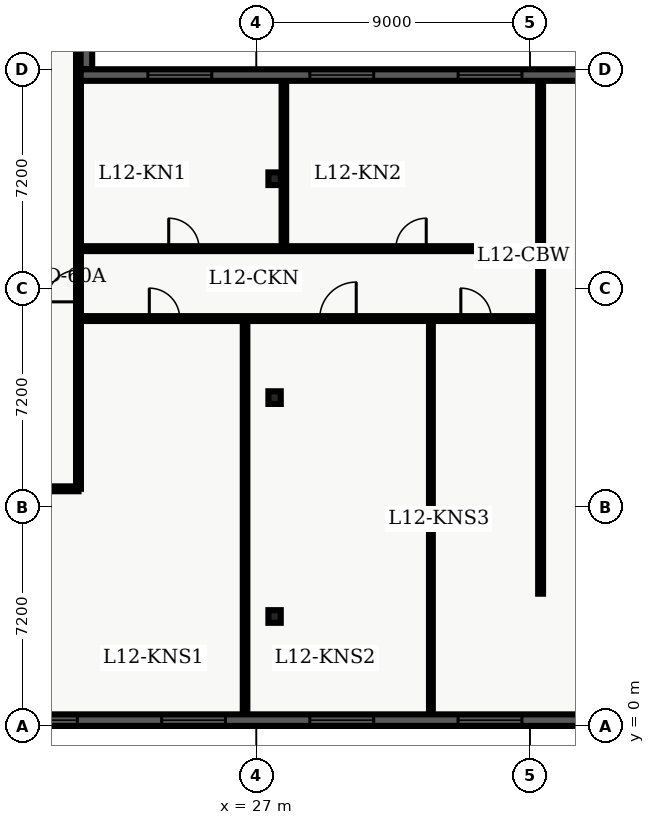
"""IFC4 building model, lengths in metres.
Left out: names, types, materials, properties, quantities, classifications, styles, units other than length and angle.
Written with IfcOpenShell. Run it as: python <this file> out.ifc"""

import sys

from ifc_helpers import new_model, entity, si_unit, converted_unit, direction, frame, origin_with_axes, origin_2d_with_axis, place, context, subcontext, project, spatial, polyline, rectangle, i_section, outline, extrude, element, fill, save


model = new_model("IFC4")
c1 = context("Model", 3, precision=1e-05, world=origin_with_axes(), true_north=direction((0.0, 1.0)))
c2 = subcontext(c1, "Body", "Model", "MODEL_VIEW")
j1 = project(units=[si_unit("LENGTHUNIT", "METRE"), converted_unit("PLANEANGLEUNIT", "DEGREE", entity("IfcPlaneAngleMeasure", 0.017), si_unit("PLANEANGLEUNIT", "RADIAN"), dimensions=[0, 0, 0, 0, 0, 0, 0])], contexts=[c1])
p1 = place(None, origin_with_axes())
s1 = spatial("IfcSite", under=j1, at=p1, CompositionType="ELEMENT")
p2 = place(p1, origin_with_axes())
s2 = spatial("IfcBuilding", under=s1, at=p2, CompositionType="ELEMENT")
p3 = place(p2, frame((0.0, 0.0, 52.2), z_axis=(0.0, 0.0, 1.0), x_axis=(1.0, 0.0, 0.0)))
s3 = spatial("IfcBuildingStorey", under=s2, at=p3, CompositionType="ELEMENT", Elevation=52.2)
for number, where, z_axis, x_axis in (
    (1, (27.6, 3.6, 0.0), (0.0, 0.0, 1.0), (1.0, 0.0, 0.0)),
    (2, (27.6, 10.8, 0.0), (0.0, 0.0, 1.0), (1.0, 0.0, 0.0)),
    (3, (27.6, 18.0, 0.0), (0.0, 0.0, 1.0), (1.0, 0.0, 0.0)),
):
    element("IfcColumn", number, at=place(p3, frame(where, z_axis=z_axis, x_axis=x_axis)), inside=s3, PredefinedType="COLUMN", context=c2, shape_type="SweptSolid", body=[
        extrude(i_section(OverallWidth=0.406, OverallDepth=0.416, WebThickness=0.03, FlangeThickness=0.048, FilletRadius=0.022, at=origin_2d_with_axis()), origin_with_axes(), (0.0, 0.0, 1.0), 3.9),
    ])
p4 = place(p3, frame((2.6, 7.8, 0.0), z_axis=(0.0, 0.0, 1.0), x_axis=(1.0, 0.0, 0.0)))
e4 = element("IfcWall", 4, at=p4, inside=s3, PredefinedType="PARTITIONING", context=c2, shape_type="SweptSolid", body=[
    extrude(outline(polyline([(0.0, -0.08), (18.55, -0.08), (18.55, 0.08), (0.0, 0.08), (0.0, -0.08)])), origin_with_axes(), (0.0, 0.0, 1.0), 2.7),
])
p5 = place(p4, frame((6.426, 0.0, 0.0), z_axis=(0.0, 0.0, 1.0), x_axis=(1.0, 0.0, 0.0)))
e5 = element("IfcOpeningElement", 5, at=p5, cuts=e4, PredefinedType="OPENING", context=c2, shape_type="SweptSolid", body=[
    extrude(rectangle(XDim=1.2, YDim=0.18, at=origin_2d_with_axis()), origin_with_axes(), (0.0, 0.0, 1.0), 2.2),
])
p6 = place(p4, frame((15.681, 0.0, 0.0), z_axis=(0.0, 0.0, 1.0), x_axis=(1.0, 0.0, 0.0)))
e6 = element("IfcOpeningElement", 6, at=p6, cuts=e4, PredefinedType="OPENING", context=c2, shape_type="SweptSolid", body=[
    extrude(rectangle(XDim=1.0, YDim=0.18, at=origin_2d_with_axis()), origin_with_axes(), (0.0, 0.0, 1.0), 2.15),
])
p7 = place(p3, frame((21.15, 7.8, 0.0), z_axis=(0.0, 0.0, 1.0), x_axis=(0.0, 1.0, 0.0)))
e7 = element("IfcWall", 7, at=p7, inside=s3, PredefinedType="PARTITIONING", context=c2, shape_type="SweptSolid", body=[
    extrude(outline(polyline([(0.0, -0.08), (32.7, -0.08), (32.7, 0.08), (0.0, 0.08), (0.0, -0.08)])), origin_with_axes(), (0.0, 0.0, 1.0), 2.7),
])
p8 = place(p7, frame((6.675, 0.0, 0.0), z_axis=(0.0, 0.0, 1.0), x_axis=(1.0, 0.0, 0.0)))
e8 = element("IfcOpeningElement", 8, at=p8, cuts=e7, PredefinedType="OPENING", context=c2, shape_type="SweptSolid", body=[
    extrude(rectangle(XDim=1.05, YDim=0.18, at=origin_2d_with_axis()), origin_with_axes(), (0.0, 0.0, 1.0), 2.15),
])
p9 = place(p3, frame((21.15, 13.4, 0.0), z_axis=(0.0, 0.0, 1.0), x_axis=(1.0, 0.0, 0.0)))
e9 = element("IfcWall", 9, at=p9, inside=s3, PredefinedType="PARTITIONING", context=c2, shape_type="SweptSolid", body=[
    extrude(outline(polyline([(0.0, -0.08), (15.2, -0.08), (15.2, 0.08), (0.0, 0.08), (0.0, -0.08)])), origin_with_axes(), (0.0, 0.0, 1.0), 2.7),
])
p10 = place(p9, frame((2.829, 0.0, 0.0), z_axis=(0.0, 0.0, 1.0), x_axis=(1.0, 0.0, 0.0)))
e10 = element("IfcOpeningElement", 10, at=p10, cuts=e9, PredefinedType="OPENING", context=c2, shape_type="SweptSolid", body=[
    extrude(rectangle(XDim=1.0, YDim=0.18, at=origin_2d_with_axis()), origin_with_axes(), (0.0, 0.0, 1.0), 2.15),
])
p11 = place(p9, frame((8.536, 0.0, 0.0), z_axis=(0.0, 0.0, 1.0), x_axis=(1.0, 0.0, 0.0)))
e11 = element("IfcOpeningElement", 11, at=p11, cuts=e9, PredefinedType="OPENING", context=c2, shape_type="SweptSolid", body=[
    extrude(rectangle(XDim=1.2, YDim=0.18, at=origin_2d_with_axis()), origin_with_axes(), (0.0, 0.0, 1.0), 2.2),
])
p12 = place(p9, frame((13.076, 0.0, 0.0), z_axis=(0.0, 0.0, 1.0), x_axis=(1.0, 0.0, 0.0)))
e12 = element("IfcOpeningElement", 12, at=p12, cuts=e9, PredefinedType="OPENING", context=c2, shape_type="SweptSolid", body=[
    extrude(rectangle(XDim=1.0, YDim=0.18, at=origin_2d_with_axis()), origin_with_axes(), (0.0, 0.0, 1.0), 2.15),
])
p13 = place(p3, frame((21.15, 15.7, 0.0), z_axis=(0.0, 0.0, 1.0), x_axis=(1.0, 0.0, 0.0)))
e13 = element("IfcWall", 13, at=p13, inside=s3, PredefinedType="PARTITIONING", context=c2, shape_type="SweptSolid", body=[
    extrude(outline(polyline([(0.0, -0.08), (15.2, -0.08), (15.2, 0.08), (0.0, 0.08), (0.0, -0.08)])), origin_with_axes(), (0.0, 0.0, 1.0), 2.7),
])
p14 = place(p13, frame((3.468, 0.0, 0.0), z_axis=(0.0, 0.0, 1.0), x_axis=(1.0, 0.0, 0.0)))
e14 = element("IfcOpeningElement", 14, at=p14, cuts=e13, PredefinedType="OPENING", context=c2, shape_type="SweptSolid", body=[
    extrude(rectangle(XDim=1.0, YDim=0.18, at=origin_2d_with_axis()), origin_with_axes(), (0.0, 0.0, 1.0), 2.15),
])
p15 = place(p13, frame((10.938, 0.0, 0.0), z_axis=(0.0, 0.0, 1.0), x_axis=(1.0, 0.0, 0.0)))
e15 = element("IfcOpeningElement", 15, at=p15, cuts=e13, PredefinedType="OPENING", context=c2, shape_type="SweptSolid", body=[
    extrude(rectangle(XDim=1.0, YDim=0.18, at=origin_2d_with_axis()), origin_with_axes(), (0.0, 0.0, 1.0), 2.15),
])
p16 = place(p3, frame((36.35, 4.35, 0.0), z_axis=(0.0, 0.0, 1.0), x_axis=(0.0, 1.0, 0.0)))
e16 = element("IfcWall", 16, at=p16, inside=s3, PredefinedType="PARTITIONING", context=c2, shape_type="SweptSolid", body=[
    extrude(outline(polyline([(0.0, -0.08), (16.95, -0.08), (16.95, 0.08), (0.0, 0.08), (0.0, -0.08)])), origin_with_axes(), (0.0, 0.0, 1.0), 2.7),
])
p17 = place(p3, frame((26.629, 0.36, 0.0), z_axis=(0.0, 0.0, 1.0), x_axis=(0.0, 1.0, 0.0)))
e17 = element("IfcWall", 17, at=p17, inside=s3, PredefinedType="PARTITIONING", context=c2, shape_type="SweptSolid", body=[
    extrude(outline(polyline([(0.0, -0.075), (12.92, -0.075), (12.92, 0.075), (0.0, 0.075), (0.0, -0.075)])), origin_with_axes(), (0.0, 0.0, 1.0), 2.7),
])
p18 = place(p3, frame((32.742, 0.36, 0.0), z_axis=(0.0, 0.0, 1.0), x_axis=(0.0, 1.0, 0.0)))
e18 = element("IfcWall", 18, at=p18, inside=s3, PredefinedType="PARTITIONING", context=c2, shape_type="SweptSolid", body=[
    extrude(outline(polyline([(0.0, -0.062), (12.92, -0.062), (12.92, 0.062), (0.0, 0.062), (0.0, -0.062)])), origin_with_axes(), (0.0, 0.0, 1.0), 2.7),
])
p19 = place(p3, frame((27.906, 15.82, 0.0), z_axis=(0.0, 0.0, 1.0), x_axis=(0.0, 1.0, 0.0)))
e19 = element("IfcWall", 19, at=p19, inside=s3, PredefinedType="PARTITIONING", context=c2, shape_type="SweptSolid", body=[
    extrude(outline(polyline([(0.0, -0.075), (5.405, -0.075), (5.405, 0.075), (0.0, 0.075), (0.0, -0.075)])), origin_with_axes(), (0.0, 0.0, 1.0), 2.7),
])
p20 = place(p3, frame((57.22, 0.19, 0.0), z_axis=(0.0, 0.0, 1.0), x_axis=(-1.0, 0.0, 0.0)))
e20 = element("IfcWall", 20, at=p20, inside=s3, PredefinedType="SOLIDWALL", context=c2, shape_type="SweptSolid", body=[
    extrude(outline(polyline([(0.0, -0.19), (54.82, -0.19), (54.82, 0.19), (0.0, 0.19), (0.0, -0.19)])), origin_with_axes(), (0.0, 0.0, 1.0), 3.66),
])
p21 = place(p20, frame((3.037, 0.0, 0.45), z_axis=(0.0, 0.0, 1.0), x_axis=(1.0, 0.0, 0.0)))
e21 = element("IfcOpeningElement", 21, at=p21, cuts=e20, PredefinedType="OPENING", context=c2, shape_type="SweptSolid", body=[
    extrude(rectangle(XDim=2.1, YDim=0.4, at=origin_2d_with_axis()), origin_with_axes(), (0.0, 0.0, 1.0), 2.2),
])
p22 = place(p20, frame((7.912, 0.0, 0.45), z_axis=(0.0, 0.0, 1.0), x_axis=(1.0, 0.0, 0.0)))
e22 = element("IfcOpeningElement", 22, at=p22, cuts=e20, PredefinedType="OPENING", context=c2, shape_type="SweptSolid", body=[
    extrude(rectangle(XDim=2.1, YDim=0.4, at=origin_2d_with_axis()), origin_with_axes(), (0.0, 0.0, 1.0), 2.2),
])
p23 = place(p20, frame((12.786, 0.0, 0.45), z_axis=(0.0, 0.0, 1.0), x_axis=(1.0, 0.0, 0.0)))
e23 = element("IfcOpeningElement", 23, at=p23, cuts=e20, PredefinedType="OPENING", context=c2, shape_type="SweptSolid", body=[
    extrude(rectangle(XDim=2.1, YDim=0.4, at=origin_2d_with_axis()), origin_with_axes(), (0.0, 0.0, 1.0), 2.2),
])
p24 = place(p20, frame((17.661, 0.0, 0.45), z_axis=(0.0, 0.0, 1.0), x_axis=(1.0, 0.0, 0.0)))
e24 = element("IfcOpeningElement", 24, at=p24, cuts=e20, PredefinedType="OPENING", context=c2, shape_type="SweptSolid", body=[
    extrude(rectangle(XDim=2.1, YDim=0.4, at=origin_2d_with_axis()), origin_with_axes(), (0.0, 0.0, 1.0), 2.2),
])
p25 = place(p20, frame((22.535, 0.0, 0.45), z_axis=(0.0, 0.0, 1.0), x_axis=(1.0, 0.0, 0.0)))
e25 = element("IfcOpeningElement", 25, at=p25, cuts=e20, PredefinedType="OPENING", context=c2, shape_type="SweptSolid", body=[
    extrude(rectangle(XDim=2.1, YDim=0.4, at=origin_2d_with_axis()), origin_with_axes(), (0.0, 0.0, 1.0), 2.2),
])
p26 = place(p20, frame((27.41, 0.0, 0.45), z_axis=(0.0, 0.0, 1.0), x_axis=(1.0, 0.0, 0.0)))
e26 = element("IfcOpeningElement", 26, at=p26, cuts=e20, PredefinedType="OPENING", context=c2, shape_type="SweptSolid", body=[
    extrude(rectangle(XDim=2.1, YDim=0.4, at=origin_2d_with_axis()), origin_with_axes(), (0.0, 0.0, 1.0), 2.2),
])
p27 = place(p20, frame((32.285, 0.0, 0.45), z_axis=(0.0, 0.0, 1.0), x_axis=(1.0, 0.0, 0.0)))
e27 = element("IfcOpeningElement", 27, at=p27, cuts=e20, PredefinedType="OPENING", context=c2, shape_type="SweptSolid", body=[
    extrude(rectangle(XDim=2.1, YDim=0.4, at=origin_2d_with_axis()), origin_with_axes(), (0.0, 0.0, 1.0), 2.2),
])
p28 = place(p20, frame((37.159, 0.0, 0.45), z_axis=(0.0, 0.0, 1.0), x_axis=(1.0, 0.0, 0.0)))
e28 = element("IfcOpeningElement", 28, at=p28, cuts=e20, PredefinedType="OPENING", context=c2, shape_type="SweptSolid", body=[
    extrude(rectangle(XDim=2.1, YDim=0.4, at=origin_2d_with_axis()), origin_with_axes(), (0.0, 0.0, 1.0), 2.2),
])
p29 = place(p20, frame((46.908, 0.0, 0.45), z_axis=(0.0, 0.0, 1.0), x_axis=(1.0, 0.0, 0.0)))
e29 = element("IfcOpeningElement", 29, at=p29, cuts=e20, PredefinedType="OPENING", context=c2, shape_type="SweptSolid", body=[
    extrude(rectangle(XDim=2.1, YDim=0.4, at=origin_2d_with_axis()), origin_with_axes(), (0.0, 0.0, 1.0), 2.2),
])
p30 = place(p20, frame((51.783, 0.0, 0.45), z_axis=(0.0, 0.0, 1.0), x_axis=(1.0, 0.0, 0.0)))
e30 = element("IfcOpeningElement", 30, at=p30, cuts=e20, PredefinedType="OPENING", context=c2, shape_type="SweptSolid", body=[
    extrude(rectangle(XDim=2.1, YDim=0.4, at=origin_2d_with_axis()), origin_with_axes(), (0.0, 0.0, 1.0), 2.2),
])
p31 = place(p3, frame((21.41, 45.82, 0.0), z_axis=(0.0, 0.0, 1.0), x_axis=(0.0, -1.0, 0.0)))
e31 = element("IfcWall", 31, at=p31, inside=s3, PredefinedType="SOLIDWALL", context=c2, shape_type="SweptSolid", body=[
    extrude(outline(polyline([(0.0, -0.19), (24.22, -0.19), (24.22, 0.19), (0.0, 0.19), (0.0, -0.19)])), origin_with_axes(), (0.0, 0.0, 1.0), 3.66),
])
p32 = place(p31, frame((2.902, 0.0, 0.45), z_axis=(0.0, 0.0, 1.0), x_axis=(1.0, 0.0, 0.0)))
e32 = element("IfcOpeningElement", 32, at=p32, cuts=e31, PredefinedType="OPENING", context=c2, shape_type="SweptSolid", body=[
    extrude(rectangle(XDim=2.1, YDim=0.4, at=origin_2d_with_axis()), origin_with_axes(), (0.0, 0.0, 1.0), 2.2),
])
p33 = place(p3, frame((21.22, 21.41, 0.0), z_axis=(0.0, 0.0, 1.0), x_axis=(1.0, 0.0, 0.0)))
e33 = element("IfcWall", 33, at=p33, inside=s3, PredefinedType="SOLIDWALL", context=c2, shape_type="SweptSolid", body=[
    extrude(outline(polyline([(0.0, -0.19), (17.18, -0.19), (17.18, 0.19), (0.0, 0.19), (0.0, -0.19)])), origin_with_axes(), (0.0, 0.0, 1.0), 3.66),
])
p34 = place(p33, frame((3.263, 0.0, 0.45), z_axis=(0.0, 0.0, 1.0), x_axis=(1.0, 0.0, 0.0)))
e34 = element("IfcOpeningElement", 34, at=p34, cuts=e33, PredefinedType="OPENING", context=c2, shape_type="SweptSolid", body=[
    extrude(rectangle(XDim=2.1, YDim=0.4, at=origin_2d_with_axis()), origin_with_axes(), (0.0, 0.0, 1.0), 2.2),
])
p35 = place(p33, frame((8.59, 0.0, 0.45), z_axis=(0.0, 0.0, 1.0), x_axis=(1.0, 0.0, 0.0)))
e35 = element("IfcOpeningElement", 35, at=p35, cuts=e33, PredefinedType="OPENING", context=c2, shape_type="SweptSolid", body=[
    extrude(rectangle(XDim=2.1, YDim=0.4, at=origin_2d_with_axis()), origin_with_axes(), (0.0, 0.0, 1.0), 2.2),
])
p36 = place(p33, frame((13.467, 0.0, 0.45), z_axis=(0.0, 0.0, 1.0), x_axis=(1.0, 0.0, 0.0)))
e36 = element("IfcOpeningElement", 36, at=p36, cuts=e33, PredefinedType="OPENING", context=c2, shape_type="SweptSolid", body=[
    extrude(rectangle(XDim=2.1, YDim=0.4, at=origin_2d_with_axis()), origin_with_axes(), (0.0, 0.0, 1.0), 2.2),
])
p37 = place(p7, frame((6.675, 0.0, 0.0), z_axis=(0.0, 0.0, 1.0), x_axis=(1.0, 0.0, 0.0)))
e37 = element("IfcDoor", 37, at=p37, inside=s3, OperationType="SINGLE_SWING_LEFT", PredefinedType="DOOR", context=c2, shape_type="SweptSolid", body=[
    extrude(rectangle(XDim=1.05, YDim=0.09, at=origin_2d_with_axis()), origin_with_axes(), (0.0, 0.0, 1.0), 2.15),
])
fill(e8, e37)
p38 = place(p9, frame((2.829, 0.0, 0.0), z_axis=(0.0, 0.0, 1.0), x_axis=(1.0, 0.0, 0.0)))
e38 = element("IfcDoor", 38, at=p38, inside=s3, OperationType="SINGLE_SWING_LEFT", PredefinedType="DOOR", context=c2, shape_type="SweptSolid", body=[
    extrude(rectangle(XDim=1.0, YDim=0.09, at=origin_2d_with_axis()), origin_with_axes(), (0.0, 0.0, 1.0), 2.15),
])
fill(e10, e38)
p39 = place(p9, frame((8.536, 0.0, 0.0), z_axis=(0.0, 0.0, 1.0), x_axis=(1.0, 0.0, 0.0)))
e39 = element("IfcDoor", 39, at=p39, inside=s3, OperationType="SINGLE_SWING_RIGHT", PredefinedType="DOOR", context=c2, shape_type="SweptSolid", body=[
    extrude(rectangle(XDim=1.2, YDim=0.09, at=origin_2d_with_axis()), origin_with_axes(), (0.0, 0.0, 1.0), 2.2),
])
fill(e11, e39)
p40 = place(p9, frame((13.076, 0.0, 0.0), z_axis=(0.0, 0.0, 1.0), x_axis=(1.0, 0.0, 0.0)))
e40 = element("IfcDoor", 40, at=p40, inside=s3, OperationType="SINGLE_SWING_LEFT", PredefinedType="DOOR", context=c2, shape_type="SweptSolid", body=[
    extrude(rectangle(XDim=1.0, YDim=0.09, at=origin_2d_with_axis()), origin_with_axes(), (0.0, 0.0, 1.0), 2.15),
])
fill(e12, e40)
p41 = place(p13, frame((3.468, 0.0, 0.0), z_axis=(0.0, 0.0, 1.0), x_axis=(1.0, 0.0, 0.0)))
e41 = element("IfcDoor", 41, at=p41, inside=s3, OperationType="SINGLE_SWING_LEFT", PredefinedType="DOOR", context=c2, shape_type="SweptSolid", body=[
    extrude(rectangle(XDim=1.0, YDim=0.09, at=origin_2d_with_axis()), origin_with_axes(), (0.0, 0.0, 1.0), 2.15),
])
fill(e14, e41)
p42 = place(p13, frame((10.938, 0.0, 0.0), z_axis=(0.0, 0.0, 1.0), x_axis=(1.0, 0.0, 0.0)))
e42 = element("IfcDoor", 42, at=p42, inside=s3, OperationType="SINGLE_SWING_RIGHT", PredefinedType="DOOR", context=c2, shape_type="SweptSolid", body=[
    extrude(rectangle(XDim=1.0, YDim=0.09, at=origin_2d_with_axis()), origin_with_axes(), (0.0, 0.0, 1.0), 2.15),
])
fill(e15, e42)
p43 = place(p20, frame((22.535, 0.0, 0.45), z_axis=(0.0, 0.0, 1.0), x_axis=(1.0, 0.0, 0.0)))
e43 = element("IfcWindow", 43, at=p43, inside=s3, PredefinedType="WINDOW", context=c2, shape_type="SweptSolid", body=[
    extrude(rectangle(XDim=2.1, YDim=0.09, at=origin_2d_with_axis()), origin_with_axes(), (0.0, 0.0, 1.0), 2.2),
])
fill(e25, e43)
p44 = place(p20, frame((27.41, 0.0, 0.45), z_axis=(0.0, 0.0, 1.0), x_axis=(1.0, 0.0, 0.0)))
e44 = element("IfcWindow", 44, at=p44, inside=s3, PredefinedType="WINDOW", context=c2, shape_type="SweptSolid", body=[
    extrude(rectangle(XDim=2.1, YDim=0.09, at=origin_2d_with_axis()), origin_with_axes(), (0.0, 0.0, 1.0), 2.2),
])
fill(e26, e44)
p45 = place(p20, frame((32.285, 0.0, 0.45), z_axis=(0.0, 0.0, 1.0), x_axis=(1.0, 0.0, 0.0)))
e45 = element("IfcWindow", 45, at=p45, inside=s3, PredefinedType="WINDOW", context=c2, shape_type="SweptSolid", body=[
    extrude(rectangle(XDim=2.1, YDim=0.09, at=origin_2d_with_axis()), origin_with_axes(), (0.0, 0.0, 1.0), 2.2),
])
fill(e27, e45)
p46 = place(p20, frame((37.159, 0.0, 0.45), z_axis=(0.0, 0.0, 1.0), x_axis=(1.0, 0.0, 0.0)))
e46 = element("IfcWindow", 46, at=p46, inside=s3, PredefinedType="WINDOW", context=c2, shape_type="SweptSolid", body=[
    extrude(rectangle(XDim=2.1, YDim=0.09, at=origin_2d_with_axis()), origin_with_axes(), (0.0, 0.0, 1.0), 2.2),
])
fill(e28, e46)
p47 = place(p33, frame((3.263, 0.0, 0.45), z_axis=(0.0, 0.0, 1.0), x_axis=(1.0, 0.0, 0.0)))
e47 = element("IfcWindow", 47, at=p47, inside=s3, PredefinedType="WINDOW", context=c2, shape_type="SweptSolid", body=[
    extrude(rectangle(XDim=2.1, YDim=0.09, at=origin_2d_with_axis()), origin_with_axes(), (0.0, 0.0, 1.0), 2.2),
])
fill(e34, e47)
p48 = place(p33, frame((8.59, 0.0, 0.45), z_axis=(0.0, 0.0, 1.0), x_axis=(1.0, 0.0, 0.0)))
e48 = element("IfcWindow", 48, at=p48, inside=s3, PredefinedType="WINDOW", context=c2, shape_type="SweptSolid", body=[
    extrude(rectangle(XDim=2.1, YDim=0.09, at=origin_2d_with_axis()), origin_with_axes(), (0.0, 0.0, 1.0), 2.2),
])
fill(e35, e48)
p49 = place(p33, frame((13.467, 0.0, 0.45), z_axis=(0.0, 0.0, 1.0), x_axis=(1.0, 0.0, 0.0)))
e49 = element("IfcWindow", 49, at=p49, inside=s3, PredefinedType="WINDOW", context=c2, shape_type="SweptSolid", body=[
    extrude(rectangle(XDim=2.1, YDim=0.09, at=origin_2d_with_axis()), origin_with_axes(), (0.0, 0.0, 1.0), 2.2),
])
fill(e36, e49)
save(model, sys.argv[1])
